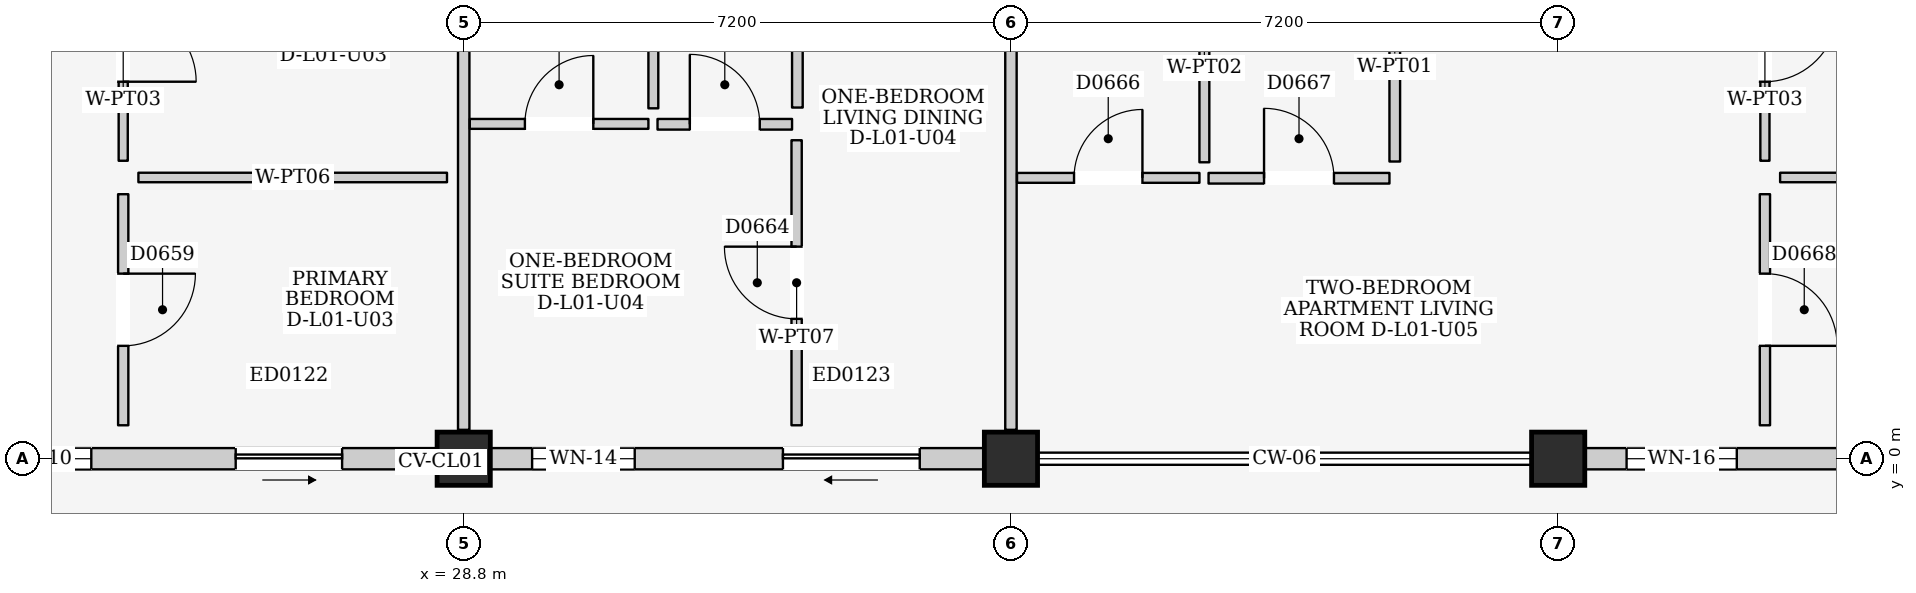
"""IFC4 building model, lengths in metres.
Left out: names, types, materials, properties, quantities, classifications, styles, units other than length and angle.
Written with IfcOpenShell. Run it as: python <this file> out.ifc"""

import sys

from ifc_helpers import new_model, si_unit, direction, frame, frame_2d, origin, origin_2d, place, context, subcontext, project, spatial, rectangle, extrude, element, fill, save


model = new_model("IFC4")
c1 = context("Model", 3, precision=1e-05, world=origin(), true_north=direction((0.0, 1.0)))
c2 = subcontext(c1, "Body", "Model", "MODEL_VIEW")
j1 = project(units=[si_unit("LENGTHUNIT", "METRE"), si_unit("PLANEANGLEUNIT", "RADIAN")], contexts=[c1])
p1 = place(None, origin())
s1 = spatial("IfcSite", under=j1, at=p1, CompositionType="ELEMENT")
p2 = place(p1, origin())
s2 = spatial("IfcBuilding", under=s1, at=p2, CompositionType="ELEMENT")
p3 = place(p2, frame((0.0, 0.0, 4.5)))
s3 = spatial("IfcBuildingStorey", under=s2, at=p3, CompositionType="ELEMENT", Elevation=4.5)
for number, where, z_axis, x_axis in (
    (1, (28.8, 0.0, 0.0), (0.0, 0.0, 1.0), (1.0, 0.0, 0.0)),
    (2, (36.0, 0.0, 0.0), (0.0, 0.0, 1.0), (1.0, 0.0, 0.0)),
    (3, (43.2, 0.0, 0.0), (0.0, 0.0, 1.0), (1.0, 0.0, 0.0)),
):
    element("IfcColumn", number, at=place(p3, frame(where, z_axis=z_axis, x_axis=x_axis)), inside=s3, PredefinedType="COLUMN", context=c2, shape_type="SweptSolid", body=[
        extrude(rectangle(XDim=0.7, YDim=0.7, at=origin_2d()), origin(), (0.0, 0.0, 1.0), 4.5),
    ])
p4 = place(p3, frame((21.95, 0.0, 0.0), z_axis=(0.0, 0.0, 1.0), x_axis=(1.0, 0.0, 0.0)))
e4 = element("IfcWall", 4, at=p4, inside=s3, PredefinedType="ELEMENTEDWALL", context=c2, shape_type="SweptSolid", body=[
    extrude(rectangle(XDim=6.5, YDim=0.28, at=frame_2d((3.25, 0.0))), origin(), (0.0, 0.0, 1.0), 3.715),
])
p5 = place(p4, frame((3.85, 0.0, 0.0)))
e5 = element("IfcOpeningElement", 5, at=p5, cuts=e4, PredefinedType="OPENING", context=c2, shape_type="SweptSolid", body=[
    extrude(rectangle(XDim=1.4, YDim=2.1, at=frame_2d((0.7, 1.05))), frame((0.0, 0.155, 0.0), z_axis=(0.0, -1.0, 0.0), x_axis=(1.0, 0.0, 0.0)), (0.0, 0.0, 1.0), 0.31),
])
p6 = place(p4, frame((0.55, 0.0, 0.9)))
e6 = element("IfcOpeningElement", 6, at=p6, cuts=e4, PredefinedType="OPENING", context=c2, shape_type="SweptSolid", body=[
    extrude(rectangle(XDim=1.4, YDim=1.2, at=frame_2d((0.7, 0.6))), frame((0.0, 0.155, 0.0), z_axis=(0.0, -1.0, 0.0), x_axis=(1.0, 0.0, 0.0)), (0.0, 0.0, 1.0), 0.31),
])
p7 = place(p3, frame((29.15, 0.0, 0.0), z_axis=(0.0, 0.0, 1.0), x_axis=(1.0, 0.0, 0.0)))
e7 = element("IfcWall", 7, at=p7, inside=s3, PredefinedType="ELEMENTEDWALL", context=c2, shape_type="SweptSolid", body=[
    extrude(rectangle(XDim=6.5, YDim=0.28, at=frame_2d((3.25, 0.0))), origin(), (0.0, 0.0, 1.0), 3.715),
])
p8 = place(p7, frame((3.85, 0.0, 0.0)))
e8 = element("IfcOpeningElement", 8, at=p8, cuts=e7, PredefinedType="OPENING", context=c2, shape_type="SweptSolid", body=[
    extrude(rectangle(XDim=1.8, YDim=2.12, at=frame_2d((0.9, 1.06))), frame((0.0, 0.155, 0.0), z_axis=(0.0, -1.0, 0.0), x_axis=(1.0, 0.0, 0.0)), (0.0, 0.0, 1.0), 0.31),
])
p9 = place(p7, frame((0.55, 0.0, 0.9)))
e9 = element("IfcOpeningElement", 9, at=p9, cuts=e7, PredefinedType="OPENING", context=c2, shape_type="SweptSolid", body=[
    extrude(rectangle(XDim=1.35, YDim=1.5, at=frame_2d((0.675, 0.75))), frame((0.0, 0.155, 0.0), z_axis=(0.0, -1.0, 0.0), x_axis=(1.0, 0.0, 0.0)), (0.0, 0.0, 1.0), 0.31),
])
p10 = place(p3, frame((43.55, 0.0, 0.0), z_axis=(0.0, 0.0, 1.0), x_axis=(1.0, 0.0, 0.0)))
e10 = element("IfcWall", 10, at=p10, inside=s3, PredefinedType="ELEMENTEDWALL", context=c2, shape_type="SweptSolid", body=[
    extrude(rectangle(XDim=6.5, YDim=0.28, at=frame_2d((3.25, 0.0))), origin(), (0.0, 0.0, 1.0), 3.715),
])
p11 = place(p10, frame((3.85, 0.0, 0.0)))
e11 = element("IfcOpeningElement", 11, at=p11, cuts=e10, PredefinedType="OPENING", context=c2, shape_type="SweptSolid", body=[
    extrude(rectangle(XDim=1.5, YDim=2.12, at=frame_2d((0.75, 1.06))), frame((0.0, 0.155, 0.0), z_axis=(0.0, -1.0, 0.0), x_axis=(1.0, 0.0, 0.0)), (0.0, 0.0, 1.0), 0.31),
])
p12 = place(p10, frame((0.55, 0.0, 0.9)))
e12 = element("IfcOpeningElement", 12, at=p12, cuts=e10, PredefinedType="OPENING", context=c2, shape_type="SweptSolid", body=[
    extrude(rectangle(XDim=1.45, YDim=1.4, at=frame_2d((0.725, 0.7))), frame((0.0, 0.155, 0.0), z_axis=(0.0, -1.0, 0.0), x_axis=(1.0, 0.0, 0.0)), (0.0, 0.0, 1.0), 0.31),
])
p13 = place(p3, frame((28.8, 0.38, 0.0), z_axis=(0.0, 0.0, 1.0), x_axis=(0.0, 1.0, 0.0)))
e13 = element("IfcWall", 13, at=p13, inside=s3, PredefinedType="PARTITIONING", context=c2, shape_type="SweptSolid", body=[
    extrude(rectangle(XDim=6.44, YDim=0.15, at=frame_2d((3.22, 0.0))), origin(), (0.0, 0.0, 1.0), 3.685),
])
p14 = place(p3, frame((24.32, 0.44, 0.0), z_axis=(0.0, 0.0, 1.0), x_axis=(0.0, 1.0, 0.0)))
e14 = element("IfcWall", 14, at=p14, inside=s3, PredefinedType="PARTITIONING", context=c2, shape_type="SweptSolid", body=[
    extrude(rectangle(XDim=3.04, YDim=0.135, at=frame_2d((1.52, 0.0))), origin(), (0.0, 0.0, 1.0), 4.25),
])
p15 = place(p14, frame((1.045, 0.0, 0.0)))
e15 = element("IfcOpeningElement", 15, at=p15, cuts=e14, PredefinedType="OPENING", context=c2, shape_type="SweptSolid", body=[
    extrude(rectangle(XDim=0.95, YDim=2.15, at=frame_2d((0.475, 1.075))), frame((0.0, 0.083, 0.0), z_axis=(0.0, -1.0, 0.0), x_axis=(1.0, 0.0, 0.0)), (0.0, 0.0, 1.0), 0.165),
])
p16 = place(p3, frame((24.52, 3.7, 0.0), z_axis=(0.0, 0.0, 1.0), x_axis=(1.0, 0.0, 0.0)))
e16 = element("IfcWall", 16, at=p16, inside=s3, PredefinedType="PARTITIONING", context=c2, shape_type="SweptSolid", body=[
    extrude(rectangle(XDim=4.06, YDim=0.125, at=frame_2d((2.03, 0.0))), origin(), (0.0, 0.0, 1.0), 4.25),
])
p17 = place(p3, frame((24.32, 3.92, 0.0), z_axis=(0.0, 0.0, 1.0), x_axis=(0.0, 1.0, 0.0)))
e17 = element("IfcWall", 17, at=p17, inside=s3, PredefinedType="PARTITIONING", context=c2, shape_type="SweptSolid", body=[
    extrude(rectangle(XDim=3.04, YDim=0.12, at=frame_2d((1.52, 0.0))), origin(), (0.0, 0.0, 1.0), 4.25),
])
p18 = place(p17, frame((1.04, 0.0, 0.0)))
e18 = element("IfcOpeningElement", 18, at=p18, cuts=e17, PredefinedType="OPENING", context=c2, shape_type="SweptSolid", body=[
    extrude(rectangle(XDim=0.96, YDim=2.15, at=frame_2d((0.48, 1.075))), frame((0.0, 0.075, 0.0), z_axis=(0.0, -1.0, 0.0), x_axis=(1.0, 0.0, 0.0)), (0.0, 0.0, 1.0), 0.15),
])
p19 = place(p3, frame((36.0, 0.38, 0.0), z_axis=(0.0, 0.0, 1.0), x_axis=(0.0, 1.0, 0.0)))
e19 = element("IfcWall", 19, at=p19, inside=s3, PredefinedType="PARTITIONING", context=c2, shape_type="SweptSolid", body=[
    extrude(rectangle(XDim=6.44, YDim=0.15, at=frame_2d((3.22, 0.0))), origin(), (0.0, 0.0, 1.0), 3.685),
])
p20 = place(p3, frame((28.88, 4.405, 0.0), z_axis=(0.0, 0.0, 1.0), x_axis=(1.0, 0.0, 0.0)))
e20 = element("IfcWall", 20, at=p20, inside=s3, PredefinedType="PARTITIONING", context=c2, shape_type="SweptSolid", body=[
    extrude(rectangle(XDim=2.35, YDim=0.13, at=frame_2d((1.175, 0.0))), origin(), (0.0, 0.0, 1.0), 4.25),
])
p21 = place(p20, frame((0.725, 0.0, 0.0)))
e21 = element("IfcOpeningElement", 21, at=p21, cuts=e20, PredefinedType="OPENING", context=c2, shape_type="SweptSolid", body=[
    extrude(rectangle(XDim=0.9, YDim=2.1, at=frame_2d((0.45, 1.05))), frame((0.0, 0.08, 0.0), z_axis=(0.0, -1.0, 0.0), x_axis=(1.0, 0.0, 0.0)), (0.0, 0.0, 1.0), 0.16),
])
p22 = place(p3, frame((31.295, 4.61, 0.0), z_axis=(0.0, 0.0, 1.0), x_axis=(0.0, 1.0, 0.0)))
e22 = element("IfcWall", 22, at=p22, inside=s3, PredefinedType="PARTITIONING", context=c2, shape_type="SweptSolid", body=[
    extrude(rectangle(XDim=2.33, YDim=0.13, at=frame_2d((1.165, 0.0))), origin(), (0.0, 0.0, 1.0), 4.25),
])
p23 = place(p3, frame((31.35, 4.4, 0.0), z_axis=(0.0, 0.0, 1.0), x_axis=(1.0, 0.0, 0.0)))
e23 = element("IfcWall", 23, at=p23, inside=s3, PredefinedType="PARTITIONING", context=c2, shape_type="SweptSolid", body=[
    extrude(rectangle(XDim=1.77, YDim=0.14, at=frame_2d((0.885, 0.0))), origin(), (0.0, 0.0, 1.0), 4.25),
])
p24 = place(p23, frame((0.425, 0.0, 0.0)))
e24 = element("IfcOpeningElement", 24, at=p24, cuts=e23, PredefinedType="OPENING", context=c2, shape_type="SweptSolid", body=[
    extrude(rectangle(XDim=0.92, YDim=2.1, at=frame_2d((0.46, 1.05))), frame((0.0, 0.085, 0.0), z_axis=(0.0, -1.0, 0.0), x_axis=(1.0, 0.0, 0.0)), (0.0, 0.0, 1.0), 0.17),
])
p25 = place(p3, frame((33.19, 4.62, 0.0), z_axis=(0.0, 0.0, 1.0), x_axis=(0.0, 1.0, 0.0)))
e25 = element("IfcWall", 25, at=p25, inside=s3, PredefinedType="PARTITIONING", context=c2, shape_type="SweptSolid", body=[
    extrude(rectangle(XDim=2.35, YDim=0.14, at=frame_2d((1.175, 0.0))), origin(), (0.0, 0.0, 1.0), 4.25),
])
p26 = place(p3, frame((33.18, 0.44, 0.0), z_axis=(0.0, 0.0, 1.0), x_axis=(0.0, 1.0, 0.0)))
e26 = element("IfcWall", 26, at=p26, inside=s3, PredefinedType="PARTITIONING", context=c2, shape_type="SweptSolid", body=[
    extrude(rectangle(XDim=3.75, YDim=0.135, at=frame_2d((1.875, 0.0))), origin(), (0.0, 0.0, 1.0), 4.25),
])
p27 = place(p26, frame((1.4, 0.0, 0.0)))
e27 = element("IfcOpeningElement", 27, at=p27, cuts=e26, PredefinedType="OPENING", context=c2, shape_type="SweptSolid", body=[
    extrude(rectangle(XDim=0.95, YDim=2.15, at=frame_2d((0.475, 1.075))), frame((0.0, 0.083, 0.0), z_axis=(0.0, -1.0, 0.0), x_axis=(1.0, 0.0, 0.0)), (0.0, 0.0, 1.0), 0.165),
])
p28 = place(p3, frame((36.08, 3.695, 0.0), z_axis=(0.0, 0.0, 1.0), x_axis=(1.0, 0.0, 0.0)))
e28 = element("IfcWall", 28, at=p28, inside=s3, PredefinedType="PARTITIONING", context=c2, shape_type="SweptSolid", body=[
    extrude(rectangle(XDim=2.4, YDim=0.13, at=frame_2d((1.2, 0.0))), origin(), (0.0, 0.0, 1.0), 4.25),
])
p29 = place(p28, frame((0.75, 0.0, 0.0)))
e29 = element("IfcOpeningElement", 29, at=p29, cuts=e28, PredefinedType="OPENING", context=c2, shape_type="SweptSolid", body=[
    extrude(rectangle(XDim=0.9, YDim=2.1, at=frame_2d((0.45, 1.05))), frame((0.0, 0.08, 0.0), z_axis=(0.0, -1.0, 0.0), x_axis=(1.0, 0.0, 0.0)), (0.0, 0.0, 1.0), 0.16),
])
p30 = place(p3, frame((38.545, 3.9, 0.0), z_axis=(0.0, 0.0, 1.0), x_axis=(0.0, 1.0, 0.0)))
e30 = element("IfcWall", 30, at=p30, inside=s3, PredefinedType="PARTITIONING", context=c2, shape_type="SweptSolid", body=[
    extrude(rectangle(XDim=3.04, YDim=0.13, at=frame_2d((1.52, 0.0))), origin(), (0.0, 0.0, 1.0), 4.25),
])
p31 = place(p3, frame((38.6, 3.69, 0.0), z_axis=(0.0, 0.0, 1.0), x_axis=(1.0, 0.0, 0.0)))
e31 = element("IfcWall", 31, at=p31, inside=s3, PredefinedType="PARTITIONING", context=c2, shape_type="SweptSolid", body=[
    extrude(rectangle(XDim=2.38, YDim=0.14, at=frame_2d((1.19, 0.0))), origin(), (0.0, 0.0, 1.0), 4.25),
])
p32 = place(p31, frame((0.73, 0.0, 0.0)))
e32 = element("IfcOpeningElement", 32, at=p32, cuts=e31, PredefinedType="OPENING", context=c2, shape_type="SweptSolid", body=[
    extrude(rectangle(XDim=0.92, YDim=2.1, at=frame_2d((0.46, 1.05))), frame((0.0, 0.085, 0.0), z_axis=(0.0, -1.0, 0.0), x_axis=(1.0, 0.0, 0.0)), (0.0, 0.0, 1.0), 0.17),
])
p33 = place(p3, frame((41.05, 3.91, 0.0), z_axis=(0.0, 0.0, 1.0), x_axis=(0.0, 1.0, 0.0)))
e33 = element("IfcWall", 33, at=p33, inside=s3, PredefinedType="PARTITIONING", context=c2, shape_type="SweptSolid", body=[
    extrude(rectangle(XDim=3.06, YDim=0.14, at=frame_2d((1.53, 0.0))), origin(), (0.0, 0.0, 1.0), 4.25),
])
p34 = place(p3, frame((45.92, 0.44, 0.0), z_axis=(0.0, 0.0, 1.0), x_axis=(0.0, 1.0, 0.0)))
e34 = element("IfcWall", 34, at=p34, inside=s3, PredefinedType="PARTITIONING", context=c2, shape_type="SweptSolid", body=[
    extrude(rectangle(XDim=3.04, YDim=0.135, at=frame_2d((1.52, 0.0))), origin(), (0.0, 0.0, 1.0), 4.25),
])
p35 = place(p34, frame((1.045, 0.0, 0.0)))
e35 = element("IfcOpeningElement", 35, at=p35, cuts=e34, PredefinedType="OPENING", context=c2, shape_type="SweptSolid", body=[
    extrude(rectangle(XDim=0.95, YDim=2.15, at=frame_2d((0.475, 1.075))), frame((0.0, 0.083, 0.0), z_axis=(0.0, -1.0, 0.0), x_axis=(1.0, 0.0, 0.0)), (0.0, 0.0, 1.0), 0.165),
])
p36 = place(p3, frame((46.12, 3.7, 0.0), z_axis=(0.0, 0.0, 1.0), x_axis=(1.0, 0.0, 0.0)))
e36 = element("IfcWall", 36, at=p36, inside=s3, PredefinedType="PARTITIONING", context=c2, shape_type="SweptSolid", body=[
    extrude(rectangle(XDim=4.06, YDim=0.125, at=frame_2d((2.03, 0.0))), origin(), (0.0, 0.0, 1.0), 4.25),
])
p37 = place(p3, frame((45.92, 3.92, 0.0), z_axis=(0.0, 0.0, 1.0), x_axis=(0.0, 1.0, 0.0)))
e37 = element("IfcWall", 37, at=p37, inside=s3, PredefinedType="PARTITIONING", context=c2, shape_type="SweptSolid", body=[
    extrude(rectangle(XDim=3.04, YDim=0.12, at=frame_2d((1.52, 0.0))), origin(), (0.0, 0.0, 1.0), 4.25),
])
p38 = place(p37, frame((1.04, 0.0, 0.0)))
e38 = element("IfcOpeningElement", 38, at=p38, cuts=e37, PredefinedType="OPENING", context=c2, shape_type="SweptSolid", body=[
    extrude(rectangle(XDim=0.96, YDim=2.15, at=frame_2d((0.48, 1.075))), frame((0.0, 0.075, 0.0), z_axis=(0.0, -1.0, 0.0), x_axis=(1.0, 0.0, 0.0)), (0.0, 0.0, 1.0), 0.15),
])
p39 = place(p5, frame((1.4, 0.0, 0.0), z_axis=(0.0, 0.0, 1.0), x_axis=(-1.0, 0.0, 0.0)))
e39 = element("IfcDoor", 39, at=p39, inside=s3, OperationType="SLIDING_TO_RIGHT", PredefinedType="DOOR", context=c2, shape_type="SweptSolid", body=[
    extrude(rectangle(XDim=1.4, YDim=2.1, at=frame_2d((0.7, 1.05))), frame((0.0, 0.025, 0.0), z_axis=(0.0, -1.0, 0.0), x_axis=(1.0, 0.0, 0.0)), (0.0, 0.0, 1.0), 0.05),
])
fill(e5, e39)
p40 = place(p6, origin())
e40 = element("IfcWindow", 40, at=p40, inside=s3, PartitioningType="DOUBLE_PANEL_HORIZONTAL", PredefinedType="WINDOW", context=c2, shape_type="SweptSolid", body=[
    extrude(rectangle(XDim=1.4, YDim=1.2, at=frame_2d((0.7, 0.6))), frame((0.0, 0.03, 0.0), z_axis=(0.0, -1.0, 0.0), x_axis=(1.0, 0.0, 0.0)), (0.0, 0.0, 1.0), 0.06),
])
fill(e6, e40)
p41 = place(p8, frame((1.8, 0.0, 0.0), z_axis=(0.0, 0.0, 1.0), x_axis=(-1.0, 0.0, 0.0)))
e41 = element("IfcDoor", 41, at=p41, inside=s3, OperationType="SLIDING_TO_LEFT", PredefinedType="DOOR", context=c2, shape_type="SweptSolid", body=[
    extrude(rectangle(XDim=1.8, YDim=2.12, at=frame_2d((0.9, 1.06))), frame((0.0, 0.025, 0.0), z_axis=(0.0, -1.0, 0.0), x_axis=(1.0, 0.0, 0.0)), (0.0, 0.0, 1.0), 0.05),
])
fill(e8, e41)
p42 = place(p9, origin())
e42 = element("IfcWindow", 42, at=p42, inside=s3, PartitioningType="SINGLE_PANEL", PredefinedType="WINDOW", context=c2, shape_type="SweptSolid", body=[
    extrude(rectangle(XDim=1.35, YDim=1.5, at=frame_2d((0.675, 0.75))), frame((0.0, 0.03, 0.0), z_axis=(0.0, -1.0, 0.0), x_axis=(1.0, 0.0, 0.0)), (0.0, 0.0, 1.0), 0.06),
])
fill(e9, e42)
p43 = place(p12, origin())
e43 = element("IfcWindow", 43, at=p43, inside=s3, PartitioningType="DOUBLE_PANEL_VERTICAL", PredefinedType="WINDOW", context=c2, shape_type="SweptSolid", body=[
    extrude(rectangle(XDim=1.45, YDim=1.4, at=frame_2d((0.725, 0.7))), frame((0.0, 0.03, 0.0), z_axis=(0.0, -1.0, 0.0), x_axis=(1.0, 0.0, 0.0)), (0.0, 0.0, 1.0), 0.06),
])
fill(e12, e43)
p44 = place(p15, frame((0.95, 0.0, 0.0), z_axis=(0.0, 0.0, 1.0), x_axis=(-1.0, 0.0, 0.0)))
e44 = element("IfcDoor", 44, at=p44, inside=s3, OperationType="SINGLE_SWING_LEFT", PredefinedType="DOOR", context=c2, shape_type="SweptSolid", body=[
    extrude(rectangle(XDim=0.95, YDim=2.15, at=frame_2d((0.475, 1.075))), frame((0.0, 0.025, 0.0), z_axis=(0.0, -1.0, 0.0), x_axis=(1.0, 0.0, 0.0)), (0.0, 0.0, 1.0), 0.05),
])
fill(e15, e44)
p45 = place(p18, frame((0.96, 0.0, 0.0), z_axis=(0.0, 0.0, 1.0), x_axis=(-1.0, 0.0, 0.0)))
e45 = element("IfcDoor", 45, at=p45, inside=s3, OperationType="SINGLE_SWING_RIGHT", PredefinedType="DOOR", context=c2, shape_type="SweptSolid", body=[
    extrude(rectangle(XDim=0.96, YDim=2.15, at=frame_2d((0.48, 1.075))), frame((0.0, 0.025, 0.0), z_axis=(0.0, -1.0, 0.0), x_axis=(1.0, 0.0, 0.0)), (0.0, 0.0, 1.0), 0.05),
])
fill(e18, e45)
p46 = place(p21, origin())
e46 = element("IfcDoor", 46, at=p46, inside=s3, OperationType="SINGLE_SWING_RIGHT", PredefinedType="DOOR", context=c2, shape_type="SweptSolid", body=[
    extrude(rectangle(XDim=0.9, YDim=2.1, at=frame_2d((0.45, 1.05))), frame((0.0, 0.025, 0.0), z_axis=(0.0, -1.0, 0.0), x_axis=(1.0, 0.0, 0.0)), (0.0, 0.0, 1.0), 0.05),
])
fill(e21, e46)
p47 = place(p24, origin())
e47 = element("IfcDoor", 47, at=p47, inside=s3, OperationType="SINGLE_SWING_LEFT", PredefinedType="DOOR", context=c2, shape_type="SweptSolid", body=[
    extrude(rectangle(XDim=0.92, YDim=2.1, at=frame_2d((0.46, 1.05))), frame((0.0, 0.025, 0.0), z_axis=(0.0, -1.0, 0.0), x_axis=(1.0, 0.0, 0.0)), (0.0, 0.0, 1.0), 0.05),
])
fill(e24, e47)
p48 = place(p27, origin())
e48 = element("IfcDoor", 48, at=p48, inside=s3, OperationType="SINGLE_SWING_RIGHT", PredefinedType="DOOR", context=c2, shape_type="SweptSolid", body=[
    extrude(rectangle(XDim=0.95, YDim=2.15, at=frame_2d((0.475, 1.075))), frame((0.0, 0.025, 0.0), z_axis=(0.0, -1.0, 0.0), x_axis=(1.0, 0.0, 0.0)), (0.0, 0.0, 1.0), 0.05),
])
fill(e27, e48)
p49 = place(p29, origin())
e49 = element("IfcDoor", 49, at=p49, inside=s3, OperationType="SINGLE_SWING_RIGHT", PredefinedType="DOOR", context=c2, shape_type="SweptSolid", body=[
    extrude(rectangle(XDim=0.9, YDim=2.1, at=frame_2d((0.45, 1.05))), frame((0.0, 0.025, 0.0), z_axis=(0.0, -1.0, 0.0), x_axis=(1.0, 0.0, 0.0)), (0.0, 0.0, 1.0), 0.05),
])
fill(e29, e49)
p50 = place(p32, origin())
e50 = element("IfcDoor", 50, at=p50, inside=s3, OperationType="SINGLE_SWING_LEFT", PredefinedType="DOOR", context=c2, shape_type="SweptSolid", body=[
    extrude(rectangle(XDim=0.92, YDim=2.1, at=frame_2d((0.46, 1.05))), frame((0.0, 0.025, 0.0), z_axis=(0.0, -1.0, 0.0), x_axis=(1.0, 0.0, 0.0)), (0.0, 0.0, 1.0), 0.05),
])
fill(e32, e50)
p51 = place(p35, frame((0.95, 0.0, 0.0), z_axis=(0.0, 0.0, 1.0), x_axis=(-1.0, 0.0, 0.0)))
e51 = element("IfcDoor", 51, at=p51, inside=s3, OperationType="SINGLE_SWING_RIGHT", PredefinedType="DOOR", context=c2, shape_type="SweptSolid", body=[
    extrude(rectangle(XDim=0.95, YDim=2.15, at=frame_2d((0.475, 1.075))), frame((0.0, 0.025, 0.0), z_axis=(0.0, -1.0, 0.0), x_axis=(1.0, 0.0, 0.0)), (0.0, 0.0, 1.0), 0.05),
])
fill(e35, e51)
p52 = place(p38, frame((0.96, 0.0, 0.0), z_axis=(0.0, 0.0, 1.0), x_axis=(-1.0, 0.0, 0.0)))
e52 = element("IfcDoor", 52, at=p52, inside=s3, OperationType="SINGLE_SWING_LEFT", PredefinedType="DOOR", context=c2, shape_type="SweptSolid", body=[
    extrude(rectangle(XDim=0.96, YDim=2.15, at=frame_2d((0.48, 1.075))), frame((0.0, 0.025, 0.0), z_axis=(0.0, -1.0, 0.0), x_axis=(1.0, 0.0, 0.0)), (0.0, 0.0, 1.0), 0.05),
])
fill(e38, e52)
save(model, sys.argv[1])
